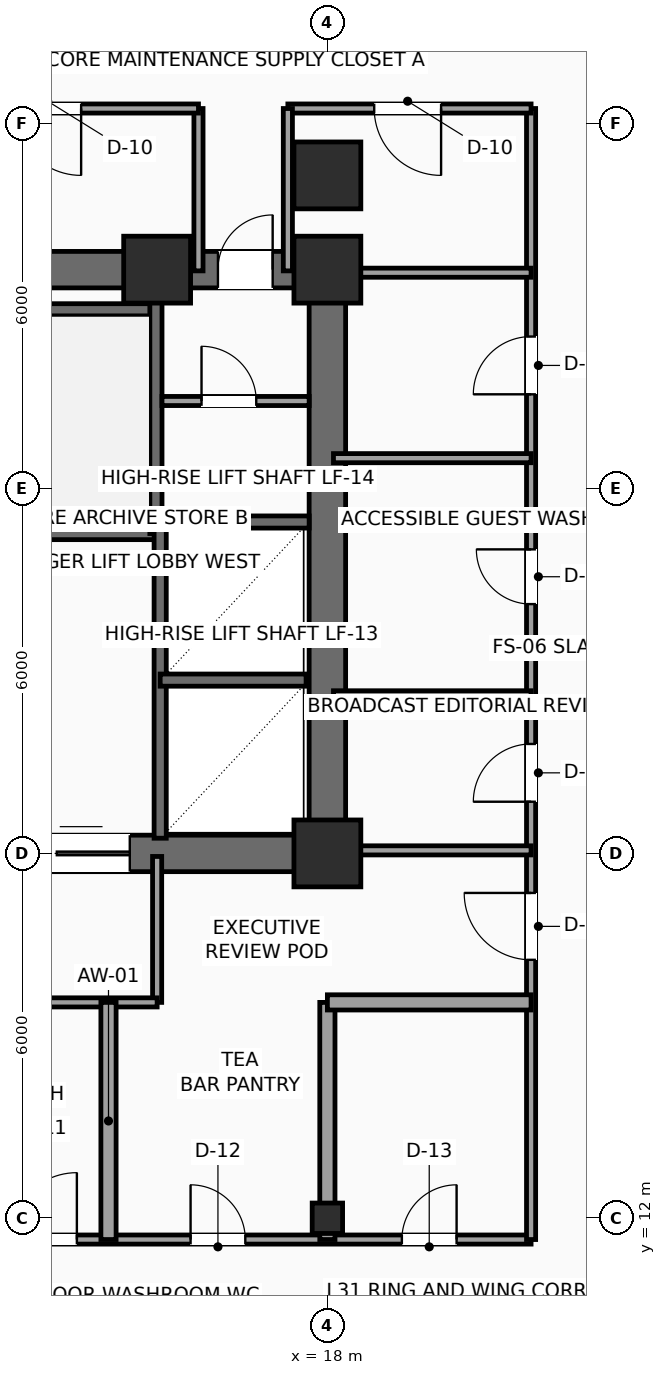
"""IFC4 building model, lengths in metres.
Left out: names, types, materials, properties, quantities, classifications, styles, units other than length and angle.
Written with IfcOpenShell. Run it as: python <this file> out.ifc"""

import sys

from ifc_helpers import new_model, si_unit, direction, frame, frame_2d, origin, origin_2d, place, context, subcontext, project, spatial, rectangle, hollow_rectangle, extrude, element, fill, save


model = new_model("IFC4")
c1 = context("Model", 3, precision=1e-05, world=origin(), true_north=direction((0.0, 1.0)))
c2 = subcontext(c1, "Body", "Model", "MODEL_VIEW")
j1 = project(units=[si_unit("LENGTHUNIT", "METRE"), si_unit("PLANEANGLEUNIT", "RADIAN")], contexts=[c1])
p1 = place(None, origin())
s1 = spatial("IfcSite", under=j1, at=p1, CompositionType="ELEMENT")
p2 = place(p1, origin())
s2 = spatial("IfcBuilding", under=s1, at=p2, CompositionType="ELEMENT")
p3 = place(p2, frame((0.0, 0.0, 130.65)))
s3 = spatial("IfcBuildingStorey", under=s2, at=p3, CompositionType="ELEMENT", Elevation=130.65)
for number, where, z_axis, x_axis in (
    (1, (18.0, 18.0, 0.0), (0.0, 0.0, 1.0), (1.0, 0.0, 0.0)),
    (2, (15.2, 27.6, 0.0), (0.0, 0.0, 1.0), (1.0, 0.0, 0.0)),
    (3, (18.0, 27.6, 0.0), (0.0, 0.0, 1.0), (1.0, 0.0, 0.0)),
):
    element("IfcColumn", number, at=place(p3, frame(where, z_axis=z_axis, x_axis=x_axis)), inside=s3, PredefinedType="COLUMN", context=c2, shape_type="SweptSolid", body=[
        extrude(rectangle(XDim=1.1, YDim=1.1, at=origin_2d()), origin(), (0.0, 0.0, 1.0), 3.75),
    ])
p4 = place(p3, frame((18.0, 12.0, 0.0), z_axis=(0.0, 0.0, 1.0), x_axis=(1.0, 0.0, 0.0)))
e4 = element("IfcColumn", 4, at=p4, inside=s3, PredefinedType="COLUMN", context=c2, shape_type="SweptSolid", body=[
    extrude(hollow_rectangle(XDim=0.5, YDim=0.5, WallThickness=0.025, InnerFilletRadius=0.025, OuterFilletRadius=0.04, at=origin_2d()), origin(), (0.0, 0.0, 1.0), 3.75),
])
p5 = place(p3, frame((18.0, 29.15, 0.0), z_axis=(0.0, 0.0, 1.0), x_axis=(1.0, 0.0, 0.0)))
e5 = element("IfcColumn", 5, at=p5, inside=s3, PredefinedType="COLUMN", context=c2, shape_type="SweptSolid", body=[
    extrude(rectangle(XDim=1.1, YDim=1.1, at=origin_2d()), origin(), (0.0, 0.0, 1.0), 3.75),
])
p6 = place(p3, frame((6.0, 18.0, 0.0), z_axis=(0.0, 0.0, 1.0), x_axis=(1.0, 0.0, 0.0)))
e6 = element("IfcWall", 6, at=p6, inside=s3, PredefinedType="SHEAR", context=c2, shape_type="SweptSolid", body=[
    extrude(rectangle(XDim=12.0, YDim=0.6, at=frame_2d((6.0, 0.0))), origin(), (0.0, 0.0, 1.0), 3.525),
])
p7 = place(p6, frame((7.15, 0.0, 0.0)))
e7 = element("IfcOpeningElement", 7, at=p7, cuts=e6, PredefinedType="OPENING", context=c2, shape_type="SweptSolid", body=[
    extrude(rectangle(XDim=1.6, YDim=2.3, at=frame_2d((0.8, 1.15))), frame((0.0, 0.31, 0.0), z_axis=(0.0, -1.0, 0.0), x_axis=(1.0, 0.0, 0.0)), (0.0, 0.0, 1.0), 0.62),
])
p8 = place(p3, frame((6.0, 27.6, 0.0), z_axis=(0.0, 0.0, 1.0), x_axis=(1.0, 0.0, 0.0)))
e8 = element("IfcWall", 8, at=p8, inside=s3, PredefinedType="SHEAR", context=c2, shape_type="SweptSolid", body=[
    extrude(rectangle(XDim=12.0, YDim=0.6, at=frame_2d((6.0, 0.0))), origin(), (0.0, 0.0, 1.0), 3.525),
])
p9 = place(p8, frame((10.2, 0.0, 0.0)))
e9 = element("IfcOpeningElement", 9, at=p9, cuts=e8, PredefinedType="OPENING", context=c2, shape_type="SweptSolid", body=[
    extrude(rectangle(XDim=0.9, YDim=2.15, at=frame_2d((0.45, 1.075))), frame((0.0, 0.31, 0.0), z_axis=(0.0, -1.0, 0.0), x_axis=(1.0, 0.0, 0.0)), (0.0, 0.0, 1.0), 0.62),
])
p10 = place(p3, frame((18.0, 18.0, 0.0), z_axis=(0.0, 0.0, 1.0), x_axis=(0.0, 1.0, 0.0)))
e10 = element("IfcWall", 10, at=p10, inside=s3, PredefinedType="SHEAR", context=c2, shape_type="SweptSolid", body=[
    extrude(rectangle(XDim=9.6, YDim=0.6, at=frame_2d((4.8, 0.0))), origin(), (0.0, 0.0, 1.0), 3.525),
])
p11 = place(p3, frame((6.3, 23.26, 0.0), z_axis=(0.0, 0.0, 1.0), x_axis=(1.0, 0.0, 0.0)))
e11 = element("IfcWall", 11, at=p11, inside=s3, PredefinedType="SHEAR", context=c2, shape_type="SweptSolid", body=[
    extrude(rectangle(XDim=8.88, YDim=0.2, at=frame_2d((4.44, 0.0))), origin(), (0.0, 0.0, 1.0), 3.525),
])
p12 = place(p11, frame((0.35, 0.0, 0.0)))
e12 = element("IfcOpeningElement", 12, at=p12, cuts=e11, PredefinedType="OPENING", context=c2, shape_type="SweptSolid", body=[
    extrude(rectangle(XDim=1.1, YDim=2.2, at=frame_2d((0.55, 1.1))), frame((0.0, 0.11, 0.0), z_axis=(0.0, -1.0, 0.0), x_axis=(1.0, 0.0, 0.0)), (0.0, 0.0, 1.0), 0.22),
])
p13 = place(p3, frame((6.3, 26.94, 0.0), z_axis=(0.0, 0.0, 1.0), x_axis=(1.0, 0.0, 0.0)))
e13 = element("IfcWall", 13, at=p13, inside=s3, PredefinedType="SHEAR", context=c2, shape_type="SweptSolid", body=[
    extrude(rectangle(XDim=8.88, YDim=0.2, at=frame_2d((4.44, 0.0))), origin(), (0.0, 0.0, 1.0), 3.525),
])
p14 = place(p3, frame((15.18, 23.26, 0.0), z_axis=(0.0, 0.0, 1.0), x_axis=(0.0, 1.0, 0.0)))
e14 = element("IfcWall", 14, at=p14, inside=s3, PredefinedType="SHEAR", context=c2, shape_type="SweptSolid", body=[
    extrude(rectangle(XDim=4.04, YDim=0.2, at=frame_2d((2.02, 0.0))), origin(), (0.0, 0.0, 1.0), 3.525),
])
p15 = place(p3, frame((15.25, 18.25, 0.0), z_axis=(0.0, 0.0, 1.0), x_axis=(0.0, 1.0, 0.0)))
e15 = element("IfcWall", 15, at=p15, inside=s3, PredefinedType="SHEAR", context=c2, shape_type="SweptSolid", body=[
    extrude(rectangle(XDim=5.2, YDim=0.2, at=frame_2d((2.6, 0.0))), origin(), (0.0, 0.0, 1.0), 3.525),
])
p16 = place(p3, frame((15.25, 20.85, 0.0), z_axis=(0.0, 0.0, 1.0), x_axis=(1.0, 0.0, 0.0)))
e16 = element("IfcWall", 16, at=p16, inside=s3, PredefinedType="SHEAR", context=c2, shape_type="SweptSolid", body=[
    extrude(rectangle(XDim=2.4, YDim=0.2, at=frame_2d((1.2, 0.0))), origin(), (0.0, 0.0, 1.0), 3.525),
])
p17 = place(p3, frame((15.25, 23.45, 0.0), z_axis=(0.0, 0.0, 1.0), x_axis=(1.0, 0.0, 0.0)))
e17 = element("IfcWall", 17, at=p17, inside=s3, PredefinedType="SHEAR", context=c2, shape_type="SweptSolid", body=[
    extrude(rectangle(XDim=2.45, YDim=0.2, at=frame_2d((1.225, 0.0))), origin(), (0.0, 0.0, 1.0), 3.525),
])
p18 = place(p3, frame((15.28, 25.44, 0.0), z_axis=(0.0, 0.0, 1.0), x_axis=(1.0, 0.0, 0.0)))
e18 = element("IfcWall", 18, at=p18, inside=s3, PredefinedType="PARTITIONING", context=c2, shape_type="SweptSolid", body=[
    extrude(rectangle(XDim=2.42, YDim=0.15, at=frame_2d((1.21, 0.0))), origin(), (0.0, 0.0, 1.0), 3.525),
])
p19 = place(p18, frame((0.65, 0.0, 0.0)))
e19 = element("IfcOpeningElement", 19, at=p19, cuts=e18, PredefinedType="OPENING", context=c2, shape_type="SweptSolid", body=[
    extrude(rectangle(XDim=0.9, YDim=2.15, at=frame_2d((0.45, 1.075))), frame((0.0, 0.085, 0.0), z_axis=(0.0, -1.0, 0.0), x_axis=(1.0, 0.0, 0.0)), (0.0, 0.0, 1.0), 0.17),
])
p20 = place(p3, frame((15.2, 17.95, 0.0), z_axis=(0.0, 0.0, 1.0), x_axis=(0.0, -1.0, 0.0)))
e20 = element("IfcWall", 20, at=p20, inside=s3, PredefinedType="PARTITIONING", context=c2, shape_type="SweptSolid", body=[
    extrude(rectangle(XDim=2.4, YDim=0.15, at=frame_2d((1.2, 0.0))), origin(), (0.0, 0.0, 1.0), 3.525),
])
p21 = place(p3, frame((15.2, 15.55, 0.0), z_axis=(0.0, 0.0, 1.0), x_axis=(-1.0, 0.0, 0.0)))
e21 = element("IfcWall", 21, at=p21, inside=s3, PredefinedType="PARTITIONING", context=c2, shape_type="SweptSolid", body=[
    extrude(rectangle(XDim=4.4, YDim=0.15, at=frame_2d((2.2, 0.0))), origin(), (0.0, 0.0, 1.0), 3.525),
])
p22 = place(p3, frame((10.8, 11.65, 0.0), z_axis=(0.0, 0.0, 1.0), x_axis=(1.0, 0.0, 0.0)))
e22 = element("IfcWall", 22, at=p22, inside=s3, PredefinedType="PARTITIONING", context=c2, shape_type="SweptSolid", body=[
    extrude(rectangle(XDim=10.55, YDim=0.15, at=frame_2d((5.275, 0.0))), origin(), (0.0, 0.0, 1.0), 3.525),
])
p23 = place(p22, frame((1.98, 0.0, 0.0)))
e23 = element("IfcOpeningElement", 23, at=p23, cuts=e22, PredefinedType="OPENING", context=c2, shape_type="SweptSolid", body=[
    extrude(rectangle(XDim=1.1, YDim=2.25, at=frame_2d((0.55, 1.125))), frame((0.0, 0.085, 0.0), z_axis=(0.0, -1.0, 0.0), x_axis=(1.0, 0.0, 0.0)), (0.0, 0.0, 1.0), 0.17),
])
p24 = place(p22, frame((4.95, 0.0, 0.0)))
e24 = element("IfcOpeningElement", 24, at=p24, cuts=e22, PredefinedType="OPENING", context=c2, shape_type="SweptSolid", body=[
    extrude(rectangle(XDim=0.9, YDim=2.1, at=frame_2d((0.45, 1.05))), frame((0.0, 0.085, 0.0), z_axis=(0.0, -1.0, 0.0), x_axis=(1.0, 0.0, 0.0)), (0.0, 0.0, 1.0), 0.17),
])
p25 = place(p22, frame((8.425, 0.0, 0.0)))
e25 = element("IfcOpeningElement", 25, at=p25, cuts=e22, PredefinedType="OPENING", context=c2, shape_type="SweptSolid", body=[
    extrude(rectangle(XDim=0.9, YDim=2.1, at=frame_2d((0.45, 1.05))), frame((0.0, 0.085, 0.0), z_axis=(0.0, -1.0, 0.0), x_axis=(1.0, 0.0, 0.0)), (0.0, 0.0, 1.0), 0.17),
])
p26 = place(p3, frame((21.35, 11.65, 0.0), z_axis=(0.0, 0.0, 1.0), x_axis=(0.0, 1.0, 0.0)))
e26 = element("IfcWall", 26, at=p26, inside=s3, PredefinedType="PARTITIONING", context=c2, shape_type="SweptSolid", body=[
    extrude(rectangle(XDim=18.6, YDim=0.15, at=frame_2d((9.3, 0.0))), origin(), (0.0, 0.0, 1.0), 3.525),
])
p27 = place(p26, frame((7.2, 0.0, 0.0)))
e27 = element("IfcOpeningElement", 27, at=p27, cuts=e26, PredefinedType="OPENING", context=c2, shape_type="SweptSolid", body=[
    extrude(rectangle(XDim=0.95, YDim=2.15, at=frame_2d((0.475, 1.075))), frame((0.0, 0.085, 0.0), z_axis=(0.0, -1.0, 0.0), x_axis=(1.0, 0.0, 0.0)), (0.0, 0.0, 1.0), 0.17),
])
p28 = place(p26, frame((10.45, 0.0, 0.0)))
e28 = element("IfcOpeningElement", 28, at=p28, cuts=e26, PredefinedType="OPENING", context=c2, shape_type="SweptSolid", body=[
    extrude(rectangle(XDim=0.9, YDim=2.1, at=frame_2d((0.45, 1.05))), frame((0.0, 0.085, 0.0), z_axis=(0.0, -1.0, 0.0), x_axis=(1.0, 0.0, 0.0)), (0.0, 0.0, 1.0), 0.17),
])
p29 = place(p26, frame((13.9, 0.0, 0.0)))
e29 = element("IfcOpeningElement", 29, at=p29, cuts=e26, PredefinedType="OPENING", context=c2, shape_type="SweptSolid", body=[
    extrude(rectangle(XDim=0.95, YDim=2.15, at=frame_2d((0.475, 1.075))), frame((0.0, 0.085, 0.0), z_axis=(0.0, -1.0, 0.0), x_axis=(1.0, 0.0, 0.0)), (0.0, 0.0, 1.0), 0.17),
])
p30 = place(p26, frame((4.6, 0.0, 0.0)))
e30 = element("IfcOpeningElement", 30, at=p30, cuts=e26, PredefinedType="OPENING", context=c2, shape_type="SweptSolid", body=[
    extrude(rectangle(XDim=1.1, YDim=2.25, at=frame_2d((0.55, 1.125))), frame((0.0, 0.085, 0.0), z_axis=(0.0, -1.0, 0.0), x_axis=(1.0, 0.0, 0.0)), (0.0, 0.0, 1.0), 0.17),
])
p31 = place(p3, frame((21.35, 30.25, 0.0), z_axis=(0.0, 0.0, 1.0), x_axis=(-1.0, 0.0, 0.0)))
e31 = element("IfcWall", 31, at=p31, inside=s3, PredefinedType="PARTITIONING", context=c2, shape_type="SweptSolid", body=[
    extrude(rectangle(XDim=4.0, YDim=0.15, at=frame_2d((2.0, 0.0))), origin(), (0.0, 0.0, 1.0), 3.525),
])
p32 = place(p31, frame((1.48, 0.0, 0.0)))
e32 = element("IfcOpeningElement", 32, at=p32, cuts=e31, PredefinedType="OPENING", context=c2, shape_type="SweptSolid", body=[
    extrude(rectangle(XDim=1.1, YDim=2.25, at=frame_2d((0.55, 1.125))), frame((0.0, 0.085, 0.0), z_axis=(0.0, -1.0, 0.0), x_axis=(1.0, 0.0, 0.0)), (0.0, 0.0, 1.0), 0.17),
])
for number, where, z_axis, x_axis in (
    (33, (17.35, 30.25, 0.0), (0.0, 0.0, 1.0), (0.0, -1.0, 0.0)),
    (34, (15.88, 27.58, 0.0), (0.0, 0.0, 1.0), (0.0, 1.0, 0.0)),
):
    element("IfcWall", number, at=place(p3, frame(where, z_axis=z_axis, x_axis=x_axis)), inside=s3, PredefinedType="PARTITIONING", context=c2, shape_type="SweptSolid", body=[
        extrude(rectangle(XDim=2.67, YDim=0.15, at=frame_2d((1.335, 0.0))), origin(), (0.0, 0.0, 1.0), 3.525),
    ])
p33 = place(p3, frame((15.88, 30.25, 0.0), z_axis=(0.0, 0.0, 1.0), x_axis=(-1.0, 0.0, 0.0)))
e35 = element("IfcWall", 35, at=p33, inside=s3, PredefinedType="PARTITIONING", context=c2, shape_type="SweptSolid", body=[
    extrude(rectangle(XDim=15.58, YDim=0.15, at=frame_2d((7.79, 0.0))), origin(), (0.0, 0.0, 1.0), 3.525),
])
p34 = place(p33, frame((12.23, 0.0, 0.0)))
e36 = element("IfcOpeningElement", 36, at=p34, cuts=e35, PredefinedType="OPENING", context=c2, shape_type="SweptSolid", body=[
    extrude(rectangle(XDim=1.1, YDim=2.25, at=frame_2d((0.55, 1.125))), frame((0.0, 0.085, 0.0), z_axis=(0.0, -1.0, 0.0), x_axis=(1.0, 0.0, 0.0)), (0.0, 0.0, 1.0), 0.17),
])
p35 = place(p33, frame((6.68, 0.0, 0.0)))
e37 = element("IfcOpeningElement", 37, at=p35, cuts=e35, PredefinedType="OPENING", context=c2, shape_type="SweptSolid", body=[
    extrude(rectangle(XDim=1.1, YDim=2.25, at=frame_2d((0.55, 1.125))), frame((0.0, 0.085, 0.0), z_axis=(0.0, -1.0, 0.0), x_axis=(1.0, 0.0, 0.0)), (0.0, 0.0, 1.0), 0.17),
])
p36 = place(p33, frame((1.93, 0.0, 0.0)))
e38 = element("IfcOpeningElement", 38, at=p36, cuts=e35, PredefinedType="OPENING", context=c2, shape_type="SweptSolid", body=[
    extrude(rectangle(XDim=1.1, YDim=2.25, at=frame_2d((0.55, 1.125))), frame((0.0, 0.085, 0.0), z_axis=(0.0, -1.0, 0.0), x_axis=(1.0, 0.0, 0.0)), (0.0, 0.0, 1.0), 0.17),
])
p37 = place(p3, frame((14.4, 11.65, 0.0), z_axis=(0.0, 0.0, 1.0), x_axis=(0.0, 1.0, 0.0)))
e39 = element("IfcWall", 39, at=p37, inside=s3, PredefinedType="PARTITIONING", context=c2, shape_type="SweptSolid", body=[
    extrude(rectangle(XDim=3.9, YDim=0.25, at=frame_2d((1.95, 0.0))), origin(), (0.0, 0.0, 1.0), 3.525),
])
p38 = place(p3, frame((18.0, 11.65, 0.0), z_axis=(0.0, 0.0, 1.0), x_axis=(0.0, 1.0, 0.0)))
e40 = element("IfcWall", 40, at=p38, inside=s3, PredefinedType="PARTITIONING", context=c2, shape_type="SweptSolid", body=[
    extrude(rectangle(XDim=3.9, YDim=0.25, at=frame_2d((1.95, 0.0))), origin(), (0.0, 0.0, 1.0), 3.017),
])
p39 = place(p3, frame((18.0, 15.55, 0.0), z_axis=(0.0, 0.0, 1.0), x_axis=(1.0, 0.0, 0.0)))
e41 = element("IfcWall", 41, at=p39, inside=s3, PredefinedType="PARTITIONING", context=c2, shape_type="SweptSolid", body=[
    extrude(rectangle(XDim=3.35, YDim=0.25, at=frame_2d((1.675, 0.0))), origin(), (0.0, 0.0, 1.0), 3.525),
])
p40 = place(p3, frame((18.1, 18.05, 0.0), z_axis=(0.0, 0.0, 1.0), x_axis=(1.0, 0.0, 0.0)))
e42 = element("IfcWall", 42, at=p40, inside=s3, PredefinedType="PARTITIONING", context=c2, shape_type="SweptSolid", body=[
    extrude(rectangle(XDim=3.25, YDim=0.15, at=frame_2d((1.625, 0.0))), origin(), (0.0, 0.0, 1.0), 3.017),
])
for number, where, z_axis, x_axis in (
    (43, (18.1, 20.6, 0.0), (0.0, 0.0, 1.0), (1.0, 0.0, 0.0)),
    (44, (18.1, 24.5, 0.0), (0.0, 0.0, 1.0), (1.0, 0.0, 0.0)),
    (45, (18.1, 27.55, 0.0), (0.0, 0.0, 1.0), (1.0, 0.0, 0.0)),
):
    element("IfcWall", number, at=place(p3, frame(where, z_axis=z_axis, x_axis=x_axis)), inside=s3, PredefinedType="PARTITIONING", context=c2, shape_type="SweptSolid", body=[
        extrude(rectangle(XDim=3.25, YDim=0.15, at=frame_2d((1.625, 0.0))), origin(), (0.0, 0.0, 1.0), 3.525),
    ])
p41 = place(p7, origin())
e46 = element("IfcDoor", 46, at=p41, inside=s3, OperationType="DOUBLE_DOOR_SLIDING", PredefinedType="DOOR", context=c2, shape_type="SweptSolid", body=[
    extrude(rectangle(XDim=1.6, YDim=2.3, at=frame_2d((0.8, 1.15))), frame((0.0, 0.025, 0.0), z_axis=(0.0, -1.0, 0.0), x_axis=(1.0, 0.0, 0.0)), (0.0, 0.0, 1.0), 0.05),
])
fill(e7, e46)
p42 = place(p9, origin())
e47 = element("IfcDoor", 47, at=p42, inside=s3, OperationType="SINGLE_SWING_RIGHT", PredefinedType="DOOR", context=c2, shape_type="SweptSolid", body=[
    extrude(rectangle(XDim=0.9, YDim=2.15, at=frame_2d((0.45, 1.075))), frame((0.0, 0.025, 0.0), z_axis=(0.0, -1.0, 0.0), x_axis=(1.0, 0.0, 0.0)), (0.0, 0.0, 1.0), 0.05),
])
fill(e9, e47)
p43 = place(p19, origin())
e48 = element("IfcDoor", 48, at=p43, inside=s3, OperationType="SINGLE_SWING_LEFT", PredefinedType="DOOR", context=c2, shape_type="SweptSolid", body=[
    extrude(rectangle(XDim=0.9, YDim=2.15, at=frame_2d((0.45, 1.075))), frame((0.0, 0.025, 0.0), z_axis=(0.0, -1.0, 0.0), x_axis=(1.0, 0.0, 0.0)), (0.0, 0.0, 1.0), 0.05),
])
fill(e19, e48)
p44 = place(p23, origin())
e49 = element("IfcDoor", 49, at=p44, inside=s3, OperationType="SINGLE_SWING_RIGHT", PredefinedType="DOOR", context=c2, shape_type="SweptSolid", body=[
    extrude(rectangle(XDim=1.1, YDim=2.25, at=frame_2d((0.55, 1.125))), frame((0.0, 0.025, 0.0), z_axis=(0.0, -1.0, 0.0), x_axis=(1.0, 0.0, 0.0)), (0.0, 0.0, 1.0), 0.05),
])
fill(e23, e49)
p45 = place(p24, origin())
e50 = element("IfcDoor", 50, at=p45, inside=s3, OperationType="SINGLE_SWING_LEFT", PredefinedType="DOOR", context=c2, shape_type="SweptSolid", body=[
    extrude(rectangle(XDim=0.9, YDim=2.1, at=frame_2d((0.45, 1.05))), frame((0.0, 0.025, 0.0), z_axis=(0.0, -1.0, 0.0), x_axis=(1.0, 0.0, 0.0)), (0.0, 0.0, 1.0), 0.05),
])
fill(e24, e50)
p46 = place(p25, origin())
e51 = element("IfcDoor", 51, at=p46, inside=s3, OperationType="SINGLE_SWING_RIGHT", PredefinedType="DOOR", context=c2, shape_type="SweptSolid", body=[
    extrude(rectangle(XDim=0.9, YDim=2.1, at=frame_2d((0.45, 1.05))), frame((0.0, 0.025, 0.0), z_axis=(0.0, -1.0, 0.0), x_axis=(1.0, 0.0, 0.0)), (0.0, 0.0, 1.0), 0.05),
])
fill(e25, e51)
p47 = place(p27, origin())
e52 = element("IfcDoor", 52, at=p47, inside=s3, OperationType="SINGLE_SWING_LEFT", PredefinedType="DOOR", context=c2, shape_type="SweptSolid", body=[
    extrude(rectangle(XDim=0.95, YDim=2.15, at=frame_2d((0.475, 1.075))), frame((0.0, 0.025, 0.0), z_axis=(0.0, -1.0, 0.0), x_axis=(1.0, 0.0, 0.0)), (0.0, 0.0, 1.0), 0.05),
])
fill(e27, e52)
p48 = place(p28, origin())
e53 = element("IfcDoor", 53, at=p48, inside=s3, OperationType="SINGLE_SWING_RIGHT", PredefinedType="DOOR", context=c2, shape_type="SweptSolid", body=[
    extrude(rectangle(XDim=0.9, YDim=2.1, at=frame_2d((0.45, 1.05))), frame((0.0, 0.025, 0.0), z_axis=(0.0, -1.0, 0.0), x_axis=(1.0, 0.0, 0.0)), (0.0, 0.0, 1.0), 0.05),
])
fill(e28, e53)
p49 = place(p29, origin())
e54 = element("IfcDoor", 54, at=p49, inside=s3, OperationType="SINGLE_SWING_LEFT", PredefinedType="DOOR", context=c2, shape_type="SweptSolid", body=[
    extrude(rectangle(XDim=0.95, YDim=2.15, at=frame_2d((0.475, 1.075))), frame((0.0, 0.025, 0.0), z_axis=(0.0, -1.0, 0.0), x_axis=(1.0, 0.0, 0.0)), (0.0, 0.0, 1.0), 0.05),
])
fill(e29, e54)
p50 = place(p30, origin())
e55 = element("IfcDoor", 55, at=p50, inside=s3, OperationType="SINGLE_SWING_RIGHT", PredefinedType="DOOR", context=c2, shape_type="SweptSolid", body=[
    extrude(rectangle(XDim=1.1, YDim=2.25, at=frame_2d((0.55, 1.125))), frame((0.0, 0.025, 0.0), z_axis=(0.0, -1.0, 0.0), x_axis=(1.0, 0.0, 0.0)), (0.0, 0.0, 1.0), 0.05),
])
fill(e30, e55)
p51 = place(p32, origin())
e56 = element("IfcDoor", 56, at=p51, inside=s3, OperationType="SINGLE_SWING_LEFT", PredefinedType="DOOR", context=c2, shape_type="SweptSolid", body=[
    extrude(rectangle(XDim=1.1, YDim=2.25, at=frame_2d((0.55, 1.125))), frame((0.0, 0.025, 0.0), z_axis=(0.0, -1.0, 0.0), x_axis=(1.0, 0.0, 0.0)), (0.0, 0.0, 1.0), 0.05),
])
fill(e32, e56)
p52 = place(p36, origin())
e57 = element("IfcDoor", 57, at=p52, inside=s3, OperationType="SINGLE_SWING_LEFT", PredefinedType="DOOR", context=c2, shape_type="SweptSolid", body=[
    extrude(rectangle(XDim=1.1, YDim=2.25, at=frame_2d((0.55, 1.125))), frame((0.0, 0.025, 0.0), z_axis=(0.0, -1.0, 0.0), x_axis=(1.0, 0.0, 0.0)), (0.0, 0.0, 1.0), 0.05),
])
fill(e38, e57)
save(model, sys.argv[1])
